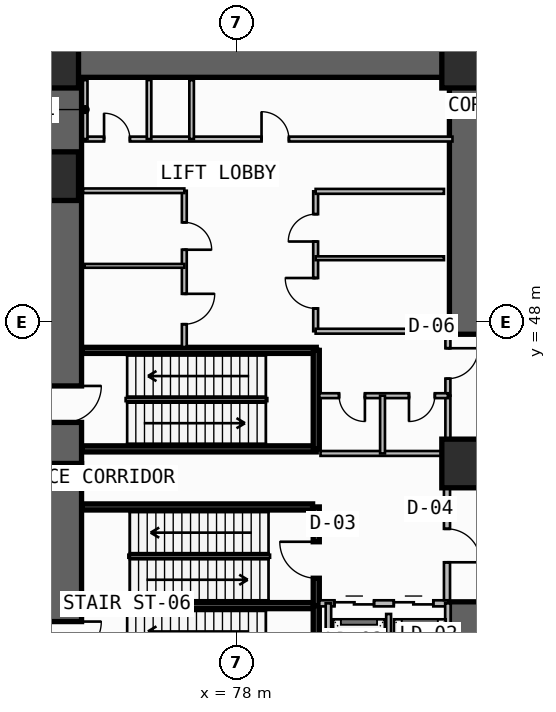
"""IFC4 building model, lengths in metres.
Left out: names, types, materials, properties, quantities, classifications, styles, units other than length and angle.
Written with IfcOpenShell. Run it as: python <this file> out.ifc"""

import sys

from ifc_helpers import new_model, si_unit, direction, frame, frame_2d, origin, origin_2d, place, context, subcontext, project, spatial, rectangle, extrude, element, fill, save


model = new_model("IFC4")
c1 = context("Model", 3, precision=1e-05, world=origin(), true_north=direction((0.0, 1.0)))
c2 = subcontext(c1, "Body", "Model", "MODEL_VIEW")
j1 = project(units=[si_unit("LENGTHUNIT", "METRE"), si_unit("PLANEANGLEUNIT", "RADIAN")], contexts=[c1])
p1 = place(None, origin())
s1 = spatial("IfcSite", under=j1, at=p1, CompositionType="ELEMENT")
p2 = place(p1, origin())
s2 = spatial("IfcBuilding", under=s1, at=p2, CompositionType="ELEMENT")
p3 = place(p2, frame((0.0, 0.0, -6.0)))
s3 = spatial("IfcBuildingStorey", under=s2, at=p3, CompositionType="ELEMENT", Elevation=-6.0)
p4 = place(p3, frame((72.35, 35.5, -0.6), z_axis=(0.0, 0.0, 1.0), x_axis=(0.0, 1.0, 0.0)))
e1 = element("IfcWall", 1, at=p4, inside=s3, PredefinedType="SHEAR", context=c2, shape_type="SweptSolid", body=[
    extrude(rectangle(XDim=7.85, YDim=1.1, at=frame_2d((3.925, 0.0))), origin(), (0.0, 0.0, 1.0), 6.2),
])
p5 = place(p4, frame((1.45, 0.0, 0.6)))
e2 = element("IfcOpeningElement", 2, at=p5, cuts=e1, PredefinedType="OPENING", context=c2, shape_type="SweptSolid", body=[
    extrude(rectangle(XDim=1.2, YDim=2.2, at=frame_2d((0.6, 1.1))), frame((0.0, 0.56, 0.0), z_axis=(0.0, -1.0, 0.0), x_axis=(1.0, 0.0, 0.0)), (0.0, 0.0, 1.0), 1.12),
])
p6 = place(p3, frame((85.55, 35.5, -0.6), z_axis=(0.0, 0.0, 1.0), x_axis=(0.0, 1.0, 0.0)))
e3 = element("IfcWall", 3, at=p6, inside=s3, PredefinedType="SHEAR", context=c2, shape_type="SweptSolid", body=[
    extrude(rectangle(XDim=3.3, YDim=1.1, at=frame_2d((1.65, 0.0))), origin(), (0.0, 0.0, 1.0), 6.2),
])
p7 = place(p3, frame((72.35, 43.35, -0.6), z_axis=(0.0, 0.0, 1.0), x_axis=(0.0, 1.0, 0.0)))
e4 = element("IfcWall", 4, at=p7, inside=s3, PredefinedType="SHEAR", context=c2, shape_type="SweptSolid", body=[
    extrude(rectangle(XDim=12.7, YDim=1.1, at=frame_2d((6.35, 0.0))), origin(), (0.0, 0.0, 1.0), 6.2),
])
p8 = place(p7, frame((1.35, 0.0, 0.6)))
e5 = element("IfcOpeningElement", 5, at=p8, cuts=e4, PredefinedType="OPENING", context=c2, shape_type="SweptSolid", body=[
    extrude(rectangle(XDim=1.2, YDim=2.2, at=frame_2d((0.6, 1.1))), frame((0.0, 0.56, 0.0), z_axis=(0.0, -1.0, 0.0), x_axis=(1.0, 0.0, 0.0)), (0.0, 0.0, 1.0), 1.12),
])
p9 = place(p3, frame((71.8, 56.6, -0.6), z_axis=(0.0, 0.0, 1.0), x_axis=(1.0, 0.0, 0.0)))
e6 = element("IfcWall", 6, at=p9, inside=s3, PredefinedType="SHEAR", context=c2, shape_type="SweptSolid", body=[
    extrude(rectangle(XDim=14.3, YDim=1.1, at=frame_2d((7.15, 0.0))), origin(), (0.0, 0.0, 1.0), 6.2),
])
p10 = place(p3, frame((85.55, 47.6, -0.6), z_axis=(0.0, 0.0, 1.0), x_axis=(0.0, 1.0, 0.0)))
e7 = element("IfcWall", 7, at=p10, inside=s3, PredefinedType="SHEAR", context=c2, shape_type="SweptSolid", body=[
    extrude(rectangle(XDim=8.45, YDim=1.1, at=frame_2d((4.225, 0.0))), origin(), (0.0, 0.0, 1.0), 6.2),
])
for number, where, z_axis, x_axis in (
    (8, (85.55, 43.35, -0.6), (0.0, 0.0, 1.0), (1.0, 0.0, 0.0)),
    (9, (72.0, 52.8, -0.6), (0.0, 0.0, 1.0), (1.0, 0.0, 0.0)),
    (10, (72.0, 56.5, -0.6), (0.0, 0.0, 1.0), (1.0, 0.0, 0.0)),
    (11, (85.55, 56.5, -0.6), (0.0, 0.0, 1.0), (1.0, 0.0, 0.0)),
):
    element("IfcColumn", number, at=place(p3, frame(where, z_axis=z_axis, x_axis=x_axis)), inside=s3, PredefinedType="COLUMN", context=c2, shape_type="SweptSolid", body=[
        extrude(rectangle(XDim=1.6, YDim=1.6, at=origin_2d()), origin(), (0.0, 0.0, 1.0), 6.6),
    ])
p11 = place(p3, frame((72.92, 38.675, -0.6), z_axis=(0.0, 0.0, 1.0), x_axis=(1.0, 0.0, 0.0)))
e12 = element("IfcWall", 12, at=p11, inside=s3, PredefinedType="SOLIDWALL", context=c2, shape_type="SweptSolid", body=[
    extrude(rectangle(XDim=7.7, YDim=0.2, at=frame_2d((3.85, 0.0))), origin(), (0.0, 0.0, 1.0), 6.2),
])
p12 = place(p3, frame((80.62, 35.52, -0.6), z_axis=(0.0, 0.0, 1.0), x_axis=(0.0, 1.0, 0.0)))
e13 = element("IfcWall", 13, at=p12, inside=s3, PredefinedType="SOLIDWALL", context=c2, shape_type="SweptSolid", body=[
    extrude(rectangle(XDim=3.155, YDim=0.2, at=frame_2d((1.578, 0.0))), origin(), (0.0, 0.0, 1.0), 6.2),
])
p13 = place(p3, frame((80.62, 38.675, -0.6), z_axis=(0.0, 0.0, 1.0), x_axis=(0.0, 1.0, 0.0)))
e14 = element("IfcWall", 14, at=p13, inside=s3, PredefinedType="SOLIDWALL", context=c2, shape_type="SweptSolid", body=[
    extrude(rectangle(XDim=3.245, YDim=0.2, at=frame_2d((1.623, 0.0))), origin(), (0.0, 0.0, 1.0), 6.2),
])
p14 = place(p13, frame((0.9, 0.0, 0.6)))
e15 = element("IfcOpeningElement", 15, at=p14, cuts=e14, PredefinedType="OPENING", context=c2, shape_type="SweptSolid", body=[
    extrude(rectangle(XDim=1.2, YDim=2.2, at=frame_2d((0.6, 1.1))), frame((0.0, 0.11, 0.0), z_axis=(0.0, -1.0, 0.0), x_axis=(1.0, 0.0, 0.0)), (0.0, 0.0, 1.0), 0.22),
])
p15 = place(p3, frame((80.72, 38.75, 0.0), z_axis=(0.0, 0.0, 1.0), x_axis=(1.0, 0.0, 0.0)))
e16 = element("IfcWall", 16, at=p15, inside=s3, PredefinedType="SOLIDWALL", context=c2, shape_type="SweptSolid", body=[
    extrude(rectangle(XDim=4.26, YDim=0.2, at=frame_2d((2.13, 0.0))), origin(), (0.0, 0.0, 1.0), 5.6),
])
p16 = place(p15, frame((0.5, 0.0, 0.0)))
e17 = element("IfcOpeningElement", 17, at=p16, cuts=e16, PredefinedType="OPENING", context=c2, shape_type="SweptSolid", body=[
    extrude(rectangle(XDim=1.3, YDim=2.3, at=frame_2d((0.65, 1.15))), frame((0.0, 0.11, 0.0), z_axis=(0.0, -1.0, 0.0), x_axis=(1.0, 0.0, 0.0)), (0.0, 0.0, 1.0), 0.22),
])
p17 = place(p15, frame((2.45, 0.0, 0.0)))
e18 = element("IfcOpeningElement", 18, at=p17, cuts=e16, PredefinedType="OPENING", context=c2, shape_type="SweptSolid", body=[
    extrude(rectangle(XDim=1.3, YDim=2.3, at=frame_2d((0.65, 1.15))), frame((0.0, 0.11, 0.0), z_axis=(0.0, -1.0, 0.0), x_axis=(1.0, 0.0, 0.0)), (0.0, 0.0, 1.0), 0.22),
])
p18 = place(p3, frame((83.0, 35.65, 0.0), z_axis=(0.0, 0.0, 1.0), x_axis=(0.0, 1.0, 0.0)))
e19 = element("IfcWall", 19, at=p18, inside=s3, PredefinedType="PLUMBINGWALL", context=c2, shape_type="SweptSolid", body=[
    extrude(rectangle(XDim=2.75, YDim=0.16, at=frame_2d((1.375, 0.0))), origin(), (0.0, 0.0, 1.0), 5.6),
])
for number, where, z_axis, x_axis in (
    (20, (84.95, 35.65, 0.0), (0.0, 0.0, 1.0), (0.0, 1.0, 0.0)),
    (21, (81.02, 35.65, 0.0), (0.0, 0.0, 1.0), (0.0, 1.0, 0.0)),
):
    element("IfcWall", number, at=place(p3, frame(where, z_axis=z_axis, x_axis=x_axis)), inside=s3, PredefinedType="SOLIDWALL", context=c2, shape_type="SweptSolid", body=[
        extrude(rectangle(XDim=3.1, YDim=0.18, at=frame_2d((1.55, 0.0))), origin(), (0.0, 0.0, 1.0), 5.6),
    ])
p19 = place(p3, frame((84.92, 38.85, 0.0), z_axis=(0.0, 0.0, 1.0), x_axis=(0.0, 1.0, 0.0)))
e22 = element("IfcWall", 22, at=p19, inside=s3, PredefinedType="SOLIDWALL", context=c2, shape_type="SweptSolid", body=[
    extrude(rectangle(XDim=4.83, YDim=0.2, at=frame_2d((2.415, 0.0))), origin(), (0.0, 0.0, 1.0), 5.6),
])
p20 = place(p19, frame((1.25, 0.0, 0.0)))
e23 = element("IfcOpeningElement", 23, at=p20, cuts=e22, PredefinedType="OPENING", context=c2, shape_type="SweptSolid", body=[
    extrude(rectangle(XDim=1.1, YDim=2.2, at=frame_2d((0.55, 1.1))), frame((0.0, 0.11, 0.0), z_axis=(0.0, -1.0, 0.0), x_axis=(1.0, 0.0, 0.0)), (0.0, 0.0, 1.0), 0.22),
])
p21 = place(p3, frame((72.92, 41.92, -0.6), z_axis=(0.0, 0.0, 1.0), x_axis=(1.0, 0.0, 0.0)))
e24 = element("IfcWall", 24, at=p21, inside=s3, PredefinedType="SOLIDWALL", context=c2, shape_type="SweptSolid", body=[
    extrude(rectangle(XDim=7.58, YDim=0.2, at=frame_2d((3.79, 0.0))), origin(), (0.0, 0.0, 1.0), 6.2),
])
for number, where, z_axis, x_axis in (
    (25, (72.92, 43.83, -0.6), (0.0, 0.0, 1.0), (1.0, 0.0, 0.0)),
    (26, (72.92, 47.07, -0.6), (0.0, 0.0, 1.0), (1.0, 0.0, 0.0)),
):
    element("IfcWall", number, at=place(p3, frame(where, z_axis=z_axis, x_axis=x_axis)), inside=s3, PredefinedType="SOLIDWALL", context=c2, shape_type="SweptSolid", body=[
        extrude(rectangle(XDim=7.7, YDim=0.2, at=frame_2d((3.85, 0.0))), origin(), (0.0, 0.0, 1.0), 6.2),
    ])
p22 = place(p3, frame((80.62, 43.83, -0.6), z_axis=(0.0, 0.0, 1.0), x_axis=(0.0, 1.0, 0.0)))
e27 = element("IfcWall", 27, at=p22, inside=s3, PredefinedType="SOLIDWALL", context=c2, shape_type="SweptSolid", body=[
    extrude(rectangle(XDim=3.24, YDim=0.2, at=frame_2d((1.62, 0.0))), origin(), (0.0, 0.0, 1.0), 6.2),
])
p23 = place(p3, frame((84.95, 43.68, 0.0), z_axis=(0.0, 0.0, 1.0), x_axis=(0.0, 1.0, 0.0)))
e28 = element("IfcWall", 28, at=p23, inside=s3, PredefinedType="PLUMBINGWALL", context=c2, shape_type="SweptSolid", body=[
    extrude(rectangle(XDim=1.9, YDim=0.165, at=frame_2d((0.95, 0.0))), origin(), (0.0, 0.0, 1.0), 5.6),
])
p24 = place(p3, frame((84.95, 45.58, 0.0), z_axis=(0.0, 0.0, 1.0), x_axis=(0.0, 1.0, 0.0)))
e29 = element("IfcWall", 29, at=p24, inside=s3, PredefinedType="PARTITIONING", context=c2, shape_type="SweptSolid", body=[
    extrude(rectangle(XDim=2.12, YDim=0.165, at=frame_2d((1.06, 0.0))), origin(), (0.0, 0.0, 1.0), 5.6),
])
p25 = place(p24, frame((0.56, 0.0, 0.0)))
e30 = element("IfcOpeningElement", 30, at=p25, cuts=e29, PredefinedType="OPENING", context=c2, shape_type="SweptSolid", body=[
    extrude(rectangle(XDim=1.0, YDim=2.2, at=frame_2d((0.5, 1.1))), frame((0.0, 0.093, 0.0), z_axis=(0.0, -1.0, 0.0), x_axis=(1.0, 0.0, 0.0)), (0.0, 0.0, 1.0), 0.185),
])
p26 = place(p3, frame((80.72, 45.58, 0.0), z_axis=(0.0, 0.0, 1.0), x_axis=(1.0, 0.0, 0.0)))
e31 = element("IfcWall", 31, at=p26, inside=s3, PredefinedType="PLUMBINGWALL", context=c2, shape_type="SweptSolid", body=[
    extrude(rectangle(XDim=4.23, YDim=0.16, at=frame_2d((2.115, 0.0))), origin(), (0.0, 0.0, 1.0), 5.6),
])
p27 = place(p26, frame((0.65, 0.0, 0.0)))
e32 = element("IfcOpeningElement", 32, at=p27, cuts=e31, PredefinedType="OPENING", context=c2, shape_type="SweptSolid", body=[
    extrude(rectangle(XDim=0.85, YDim=2.05, at=frame_2d((0.425, 1.025))), frame((0.0, 0.09, 0.0), z_axis=(0.0, -1.0, 0.0), x_axis=(1.0, 0.0, 0.0)), (0.0, 0.0, 1.0), 0.18),
])
p28 = place(p26, frame((2.95, 0.0, 0.0)))
e33 = element("IfcOpeningElement", 33, at=p28, cuts=e31, PredefinedType="OPENING", context=c2, shape_type="SweptSolid", body=[
    extrude(rectangle(XDim=0.85, YDim=2.05, at=frame_2d((0.425, 1.025))), frame((0.0, 0.09, 0.0), z_axis=(0.0, -1.0, 0.0), x_axis=(1.0, 0.0, 0.0)), (0.0, 0.0, 1.0), 0.18),
])
p29 = place(p3, frame((80.76, 43.68, 0.0), z_axis=(0.0, 0.0, 1.0), x_axis=(1.0, 0.0, 0.0)))
e34 = element("IfcWall", 34, at=p29, inside=s3, PredefinedType="PLUMBINGWALL", context=c2, shape_type="SweptSolid", body=[
    extrude(rectangle(XDim=4.19, YDim=0.16, at=frame_2d((2.095, 0.0))), origin(), (0.0, 0.0, 1.0), 5.6),
])
p30 = place(p3, frame((82.8, 43.68, 0.0), z_axis=(0.0, 0.0, 1.0), x_axis=(0.0, 1.0, 0.0)))
e35 = element("IfcWall", 35, at=p30, inside=s3, PredefinedType="PLUMBINGWALL", context=c2, shape_type="SweptSolid", body=[
    extrude(rectangle(XDim=1.9, YDim=0.16, at=frame_2d((0.95, 0.0))), origin(), (0.0, 0.0, 1.0), 5.6),
])
p31 = place(p3, frame((76.28, 47.18, 0.0), z_axis=(0.0, 0.0, 1.0), x_axis=(0.0, 1.0, 0.0)))
e36 = element("IfcWall", 36, at=p31, inside=s3, PredefinedType="SOLIDWALL", context=c2, shape_type="SweptSolid", body=[
    extrude(rectangle(XDim=5.14, YDim=0.16, at=frame_2d((2.57, 0.0))), origin(), (0.0, 0.0, 1.0), 5.6),
])
p32 = place(p31, frame((0.75, 0.0, 0.0)))
e37 = element("IfcOpeningElement", 37, at=p32, cuts=e36, PredefinedType="OPENING", context=c2, shape_type="SweptSolid", body=[
    extrude(rectangle(XDim=1.0, YDim=2.2, at=frame_2d((0.5, 1.1))), frame((0.0, 0.09, 0.0), z_axis=(0.0, -1.0, 0.0), x_axis=(1.0, 0.0, 0.0)), (0.0, 0.0, 1.0), 0.18),
])
p33 = place(p31, frame((3.2, 0.0, 0.0)))
e38 = element("IfcOpeningElement", 38, at=p33, cuts=e36, PredefinedType="OPENING", context=c2, shape_type="SweptSolid", body=[
    extrude(rectangle(XDim=0.9, YDim=2.1, at=frame_2d((0.45, 1.05))), frame((0.0, 0.09, 0.0), z_axis=(0.0, -1.0, 0.0), x_axis=(1.0, 0.0, 0.0)), (0.0, 0.0, 1.0), 0.18),
])
p34 = place(p3, frame((72.95, 52.32, 0.0), z_axis=(0.0, 0.0, 1.0), x_axis=(1.0, 0.0, 0.0)))
e39 = element("IfcWall", 39, at=p34, inside=s3, PredefinedType="SOLIDWALL", context=c2, shape_type="SweptSolid", body=[
    extrude(rectangle(XDim=3.33, YDim=0.15, at=frame_2d((1.665, 0.0))), origin(), (0.0, 0.0, 1.0), 5.6),
])
p35 = place(p3, frame((73.0, 49.85, 0.0), z_axis=(0.0, 0.0, 1.0), x_axis=(1.0, 0.0, 0.0)))
e40 = element("IfcWall", 40, at=p35, inside=s3, PredefinedType="PARTITIONING", context=c2, shape_type="SweptSolid", body=[
    extrude(rectangle(XDim=3.28, YDim=0.125, at=frame_2d((1.64, 0.0))), origin(), (0.0, 0.0, 1.0), 5.6),
])
p36 = place(p3, frame((80.6, 47.7, 0.0), z_axis=(0.0, 0.0, 1.0), x_axis=(0.0, 1.0, 0.0)))
e41 = element("IfcWall", 41, at=p36, inside=s3, PredefinedType="SOLIDWALL", context=c2, shape_type="SweptSolid", body=[
    extrude(rectangle(XDim=4.6, YDim=0.16, at=frame_2d((2.3, 0.0))), origin(), (0.0, 0.0, 1.0), 5.6),
])
p37 = place(p36, frame((0.75, 0.0, 0.0)))
e42 = element("IfcOpeningElement", 42, at=p37, cuts=e41, PredefinedType="OPENING", context=c2, shape_type="SweptSolid", body=[
    extrude(rectangle(XDim=1.0, YDim=2.2, at=frame_2d((0.5, 1.1))), frame((0.0, 0.09, 0.0), z_axis=(0.0, -1.0, 0.0), x_axis=(1.0, 0.0, 0.0)), (0.0, 0.0, 1.0), 0.18),
])
p38 = place(p36, frame((2.95, 0.0, 0.0)))
e43 = element("IfcOpeningElement", 43, at=p38, cuts=e41, PredefinedType="OPENING", context=c2, shape_type="SweptSolid", body=[
    extrude(rectangle(XDim=0.9, YDim=2.1, at=frame_2d((0.45, 1.05))), frame((0.0, 0.09, 0.0), z_axis=(0.0, -1.0, 0.0), x_axis=(1.0, 0.0, 0.0)), (0.0, 0.0, 1.0), 0.18),
])
p39 = place(p3, frame((80.6, 47.7, 0.0), z_axis=(0.0, 0.0, 1.0), x_axis=(1.0, 0.0, 0.0)))
e44 = element("IfcWall", 44, at=p39, inside=s3, PredefinedType="SOLIDWALL", context=c2, shape_type="SweptSolid", body=[
    extrude(rectangle(XDim=4.4, YDim=0.16, at=frame_2d((2.2, 0.0))), origin(), (0.0, 0.0, 1.0), 5.6),
])
p40 = place(p3, frame((80.6, 52.3, 0.0), z_axis=(0.0, 0.0, 1.0), x_axis=(1.0, 0.0, 0.0)))
e45 = element("IfcWall", 45, at=p40, inside=s3, PredefinedType="SOLIDWALL", context=c2, shape_type="SweptSolid", body=[
    extrude(rectangle(XDim=4.22, YDim=0.16, at=frame_2d((2.11, 0.0))), origin(), (0.0, 0.0, 1.0), 5.6),
])
p41 = place(p3, frame((80.6, 50.1, 0.0), z_axis=(0.0, 0.0, 1.0), x_axis=(1.0, 0.0, 0.0)))
e46 = element("IfcWall", 46, at=p41, inside=s3, PredefinedType="PARTITIONING", context=c2, shape_type="SweptSolid", body=[
    extrude(rectangle(XDim=4.22, YDim=0.125, at=frame_2d((2.11, 0.0))), origin(), (0.0, 0.0, 1.0), 5.6),
])
p42 = place(p3, frame((73.02, 54.02, 0.0), z_axis=(0.0, 0.0, 1.0), x_axis=(1.0, 0.0, 0.0)))
e47 = element("IfcWall", 47, at=p42, inside=s3, PredefinedType="SOLIDWALL", context=c2, shape_type="SweptSolid", body=[
    extrude(rectangle(XDim=12.08, YDim=0.16, at=frame_2d((6.04, 0.0))), origin(), (0.0, 0.0, 1.0), 5.6),
])
p43 = place(p42, frame((0.62, 0.0, 0.0)))
e48 = element("IfcOpeningElement", 48, at=p43, cuts=e47, PredefinedType="OPENING", context=c2, shape_type="SweptSolid", body=[
    extrude(rectangle(XDim=0.85, YDim=2.05, at=frame_2d((0.425, 1.025))), frame((0.0, 0.09, 0.0), z_axis=(0.0, -1.0, 0.0), x_axis=(1.0, 0.0, 0.0)), (0.0, 0.0, 1.0), 0.18),
])
p44 = place(p42, frame((5.8, 0.0, 0.0)))
e49 = element("IfcOpeningElement", 49, at=p44, cuts=e47, PredefinedType="OPENING", context=c2, shape_type="SweptSolid", body=[
    extrude(rectangle(XDim=0.9, YDim=2.1, at=frame_2d((0.45, 1.05))), frame((0.0, 0.09, 0.0), z_axis=(0.0, -1.0, 0.0), x_axis=(1.0, 0.0, 0.0)), (0.0, 0.0, 1.0), 0.18),
])
for number, where, z_axis, x_axis in (
    (50, (73.02, 54.02, 0.0), (0.0, 0.0, 1.0), (0.0, 1.0, 0.0)),
    (51, (75.12, 54.02, 0.0), (0.0, 0.0, 1.0), (0.0, 1.0, 0.0)),
    (52, (76.52, 54.02, 0.0), (0.0, 0.0, 1.0), (0.0, 1.0, 0.0)),
):
    element("IfcWall", number, at=place(p3, frame(where, z_axis=z_axis, x_axis=x_axis)), inside=s3, PredefinedType="PLUMBINGWALL", context=c2, shape_type="SweptSolid", body=[
        extrude(rectangle(XDim=1.94, YDim=0.15, at=frame_2d((0.97, 0.0))), origin(), (0.0, 0.0, 1.0), 5.6),
    ])
p45 = place(p5, frame((1.2, 0.0, 0.0), z_axis=(0.0, 0.0, 1.0), x_axis=(-1.0, 0.0, 0.0)))
e53 = element("IfcDoor", 53, at=p45, inside=s3, OperationType="SINGLE_SWING_LEFT", PredefinedType="USERDEFINED", context=c2, shape_type="SweptSolid", body=[
    extrude(rectangle(XDim=1.2, YDim=2.2, at=frame_2d((0.6, 1.1))), frame((0.0, 0.025, 0.0), z_axis=(0.0, -1.0, 0.0), x_axis=(1.0, 0.0, 0.0)), (0.0, 0.0, 1.0), 0.05),
])
fill(e2, e53)
p46 = place(p14, origin())
e54 = element("IfcDoor", 54, at=p46, inside=s3, OperationType="SINGLE_SWING_RIGHT", PredefinedType="USERDEFINED", context=c2, shape_type="SweptSolid", body=[
    extrude(rectangle(XDim=1.2, YDim=2.2, at=frame_2d((0.6, 1.1))), frame((0.0, 0.025, 0.0), z_axis=(0.0, -1.0, 0.0), x_axis=(1.0, 0.0, 0.0)), (0.0, 0.0, 1.0), 0.05),
])
fill(e15, e54)
p47 = place(p16, origin())
e55 = element("IfcDoor", 55, at=p47, inside=s3, OperationType="DOUBLE_DOOR_SLIDING", PredefinedType="DOOR", context=c2, shape_type="SweptSolid", body=[
    extrude(rectangle(XDim=1.3, YDim=2.3, at=frame_2d((0.65, 1.15))), frame((0.0, 0.025, 0.0), z_axis=(0.0, -1.0, 0.0), x_axis=(1.0, 0.0, 0.0)), (0.0, 0.0, 1.0), 0.05),
])
fill(e17, e55)
p48 = place(p17, origin())
e56 = element("IfcDoor", 56, at=p48, inside=s3, OperationType="DOUBLE_DOOR_SLIDING", PredefinedType="DOOR", context=c2, shape_type="SweptSolid", body=[
    extrude(rectangle(XDim=1.3, YDim=2.3, at=frame_2d((0.65, 1.15))), frame((0.0, 0.025, 0.0), z_axis=(0.0, -1.0, 0.0), x_axis=(1.0, 0.0, 0.0)), (0.0, 0.0, 1.0), 0.05),
])
fill(e18, e56)
p49 = place(p20, frame((1.1, 0.0, 0.0), z_axis=(0.0, 0.0, 1.0), x_axis=(-1.0, 0.0, 0.0)))
e57 = element("IfcDoor", 57, at=p49, inside=s3, OperationType="SINGLE_SWING_RIGHT", PredefinedType="DOOR", context=c2, shape_type="SweptSolid", body=[
    extrude(rectangle(XDim=1.1, YDim=2.2, at=frame_2d((0.55, 1.1))), frame((0.0, 0.025, 0.0), z_axis=(0.0, -1.0, 0.0), x_axis=(1.0, 0.0, 0.0)), (0.0, 0.0, 1.0), 0.05),
])
fill(e23, e57)
p50 = place(p8, frame((1.2, 0.0, 0.0), z_axis=(0.0, 0.0, 1.0), x_axis=(-1.0, 0.0, 0.0)))
e58 = element("IfcDoor", 58, at=p50, inside=s3, OperationType="SINGLE_SWING_LEFT", PredefinedType="USERDEFINED", context=c2, shape_type="SweptSolid", body=[
    extrude(rectangle(XDim=1.2, YDim=2.2, at=frame_2d((0.6, 1.1))), frame((0.0, 0.025, 0.0), z_axis=(0.0, -1.0, 0.0), x_axis=(1.0, 0.0, 0.0)), (0.0, 0.0, 1.0), 0.05),
])
fill(e5, e58)
p51 = place(p25, frame((1.0, 0.0, 0.0), z_axis=(0.0, 0.0, 1.0), x_axis=(-1.0, 0.0, 0.0)))
e59 = element("IfcDoor", 59, at=p51, inside=s3, OperationType="SINGLE_SWING_LEFT", PredefinedType="DOOR", context=c2, shape_type="SweptSolid", body=[
    extrude(rectangle(XDim=1.0, YDim=2.2, at=frame_2d((0.5, 1.1))), frame((0.0, 0.025, 0.0), z_axis=(0.0, -1.0, 0.0), x_axis=(1.0, 0.0, 0.0)), (0.0, 0.0, 1.0), 0.05),
])
fill(e30, e59)
p52 = place(p27, frame((0.85, 0.0, 0.0), z_axis=(0.0, 0.0, 1.0), x_axis=(-1.0, 0.0, 0.0)))
e60 = element("IfcDoor", 60, at=p52, inside=s3, OperationType="SINGLE_SWING_LEFT", PredefinedType="DOOR", context=c2, shape_type="SweptSolid", body=[
    extrude(rectangle(XDim=0.85, YDim=2.05, at=frame_2d((0.425, 1.025))), frame((0.0, 0.025, 0.0), z_axis=(0.0, -1.0, 0.0), x_axis=(1.0, 0.0, 0.0)), (0.0, 0.0, 1.0), 0.05),
])
fill(e32, e60)
p53 = place(p28, frame((0.85, 0.0, 0.0), z_axis=(0.0, 0.0, 1.0), x_axis=(-1.0, 0.0, 0.0)))
e61 = element("IfcDoor", 61, at=p53, inside=s3, OperationType="SINGLE_SWING_RIGHT", PredefinedType="DOOR", context=c2, shape_type="SweptSolid", body=[
    extrude(rectangle(XDim=0.85, YDim=2.05, at=frame_2d((0.425, 1.025))), frame((0.0, 0.025, 0.0), z_axis=(0.0, -1.0, 0.0), x_axis=(1.0, 0.0, 0.0)), (0.0, 0.0, 1.0), 0.05),
])
fill(e33, e61)
p54 = place(p32, frame((1.0, 0.0, 0.0), z_axis=(0.0, 0.0, 1.0), x_axis=(-1.0, 0.0, 0.0)))
e62 = element("IfcDoor", 62, at=p54, inside=s3, OperationType="SINGLE_SWING_LEFT", PredefinedType="DOOR", context=c2, shape_type="SweptSolid", body=[
    extrude(rectangle(XDim=1.0, YDim=2.2, at=frame_2d((0.5, 1.1))), frame((0.0, 0.025, 0.0), z_axis=(0.0, -1.0, 0.0), x_axis=(1.0, 0.0, 0.0)), (0.0, 0.0, 1.0), 0.05),
])
fill(e37, e62)
p55 = place(p33, frame((0.9, 0.0, 0.0), z_axis=(0.0, 0.0, 1.0), x_axis=(-1.0, 0.0, 0.0)))
e63 = element("IfcDoor", 63, at=p55, inside=s3, OperationType="SINGLE_SWING_RIGHT", PredefinedType="DOOR", context=c2, shape_type="SweptSolid", body=[
    extrude(rectangle(XDim=0.9, YDim=2.1, at=frame_2d((0.45, 1.05))), frame((0.0, 0.025, 0.0), z_axis=(0.0, -1.0, 0.0), x_axis=(1.0, 0.0, 0.0)), (0.0, 0.0, 1.0), 0.05),
])
fill(e38, e63)
p56 = place(p37, origin())
e64 = element("IfcDoor", 64, at=p56, inside=s3, OperationType="SINGLE_SWING_RIGHT", PredefinedType="DOOR", context=c2, shape_type="SweptSolid", body=[
    extrude(rectangle(XDim=1.0, YDim=2.2, at=frame_2d((0.5, 1.1))), frame((0.0, 0.025, 0.0), z_axis=(0.0, -1.0, 0.0), x_axis=(1.0, 0.0, 0.0)), (0.0, 0.0, 1.0), 0.05),
])
fill(e42, e64)
p57 = place(p38, origin())
e65 = element("IfcDoor", 65, at=p57, inside=s3, OperationType="SINGLE_SWING_LEFT", PredefinedType="DOOR", context=c2, shape_type="SweptSolid", body=[
    extrude(rectangle(XDim=0.9, YDim=2.1, at=frame_2d((0.45, 1.05))), frame((0.0, 0.025, 0.0), z_axis=(0.0, -1.0, 0.0), x_axis=(1.0, 0.0, 0.0)), (0.0, 0.0, 1.0), 0.05),
])
fill(e43, e65)
p58 = place(p43, origin())
e66 = element("IfcDoor", 66, at=p58, inside=s3, OperationType="SINGLE_SWING_LEFT", PredefinedType="DOOR", context=c2, shape_type="SweptSolid", body=[
    extrude(rectangle(XDim=0.85, YDim=2.05, at=frame_2d((0.425, 1.025))), frame((0.0, 0.025, 0.0), z_axis=(0.0, -1.0, 0.0), x_axis=(1.0, 0.0, 0.0)), (0.0, 0.0, 1.0), 0.05),
])
fill(e48, e66)
p59 = place(p44, origin())
e67 = element("IfcDoor", 67, at=p59, inside=s3, OperationType="SINGLE_SWING_LEFT", PredefinedType="DOOR", context=c2, shape_type="SweptSolid", body=[
    extrude(rectangle(XDim=0.9, YDim=2.1, at=frame_2d((0.45, 1.05))), frame((0.0, 0.025, 0.0), z_axis=(0.0, -1.0, 0.0), x_axis=(1.0, 0.0, 0.0)), (0.0, 0.0, 1.0), 0.05),
])
fill(e49, e67)
save(model, sys.argv[1])
